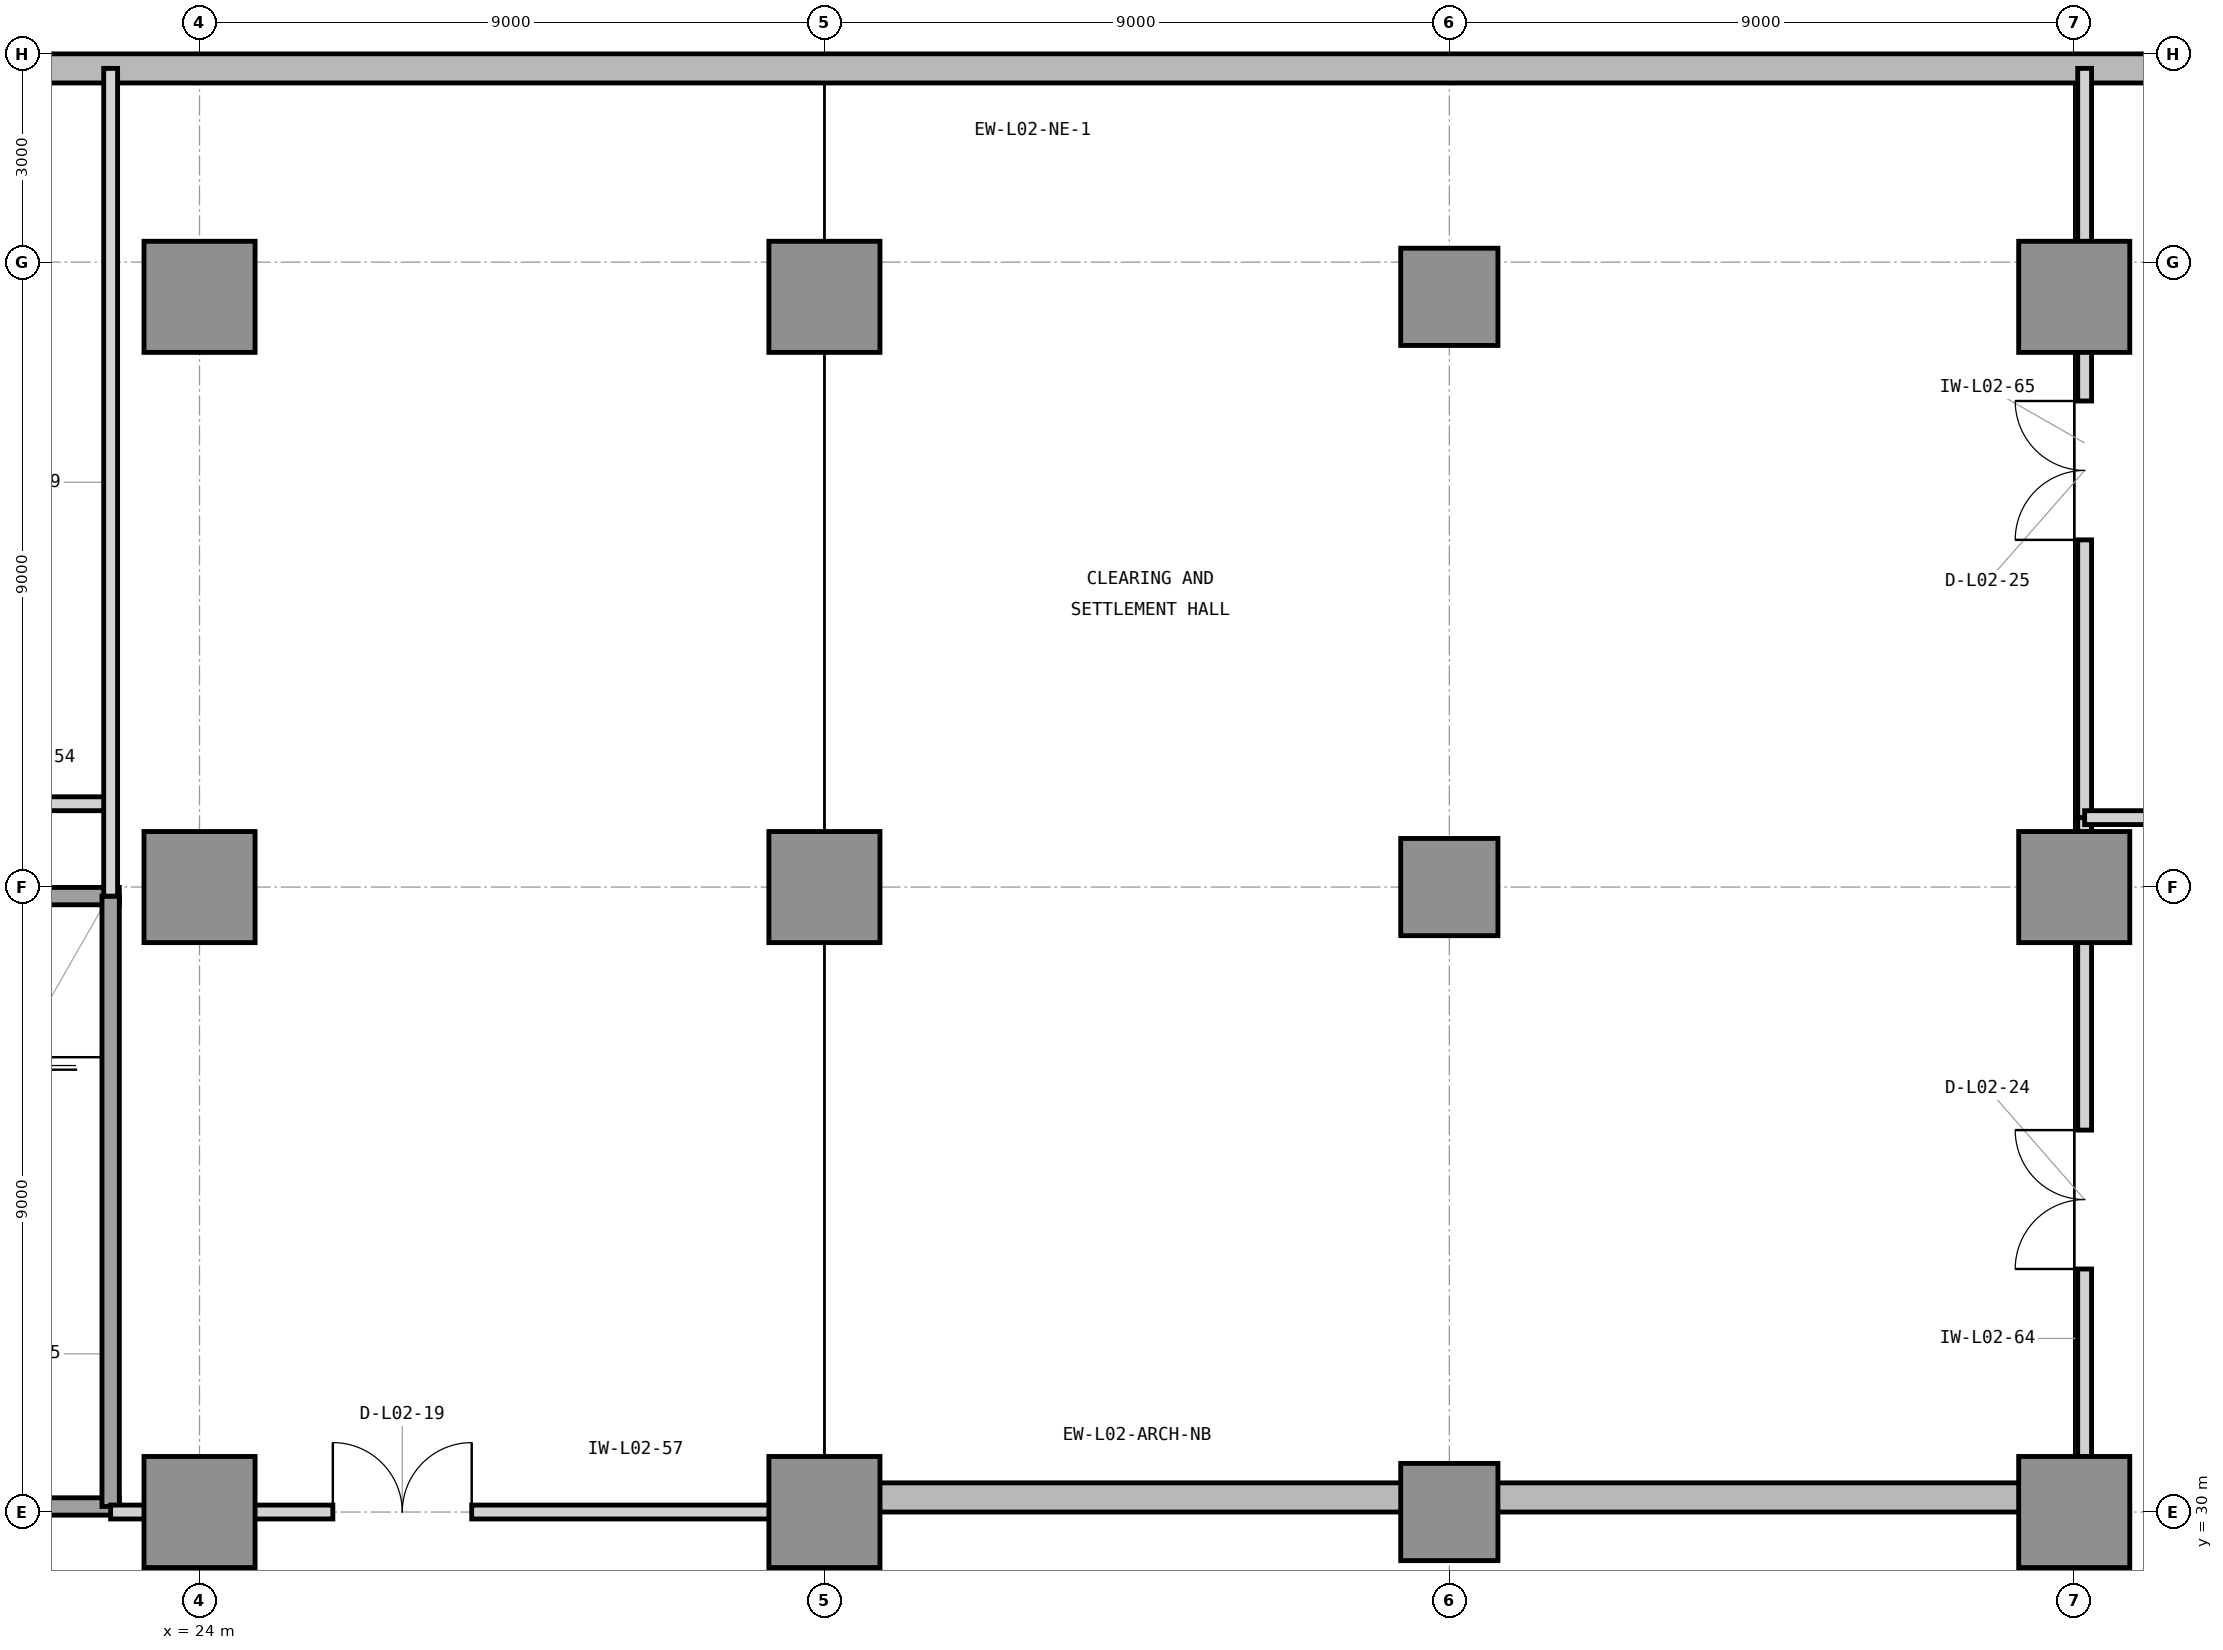
"""IFC4 building model, lengths in metres.
Left out: names, types, materials, properties, quantities, classifications, styles, units other than length and angle.
Written with IfcOpenShell. Run it as: python <this file> out.ifc"""

import sys

from ifc_helpers import new_model, si_unit, direction, frame, frame_2d, origin, origin_2d, place, context, subcontext, project, spatial, rectangle, extrude, element, fill, save


model = new_model("IFC4")
c1 = context("Model", 3, precision=1e-05, world=origin(), true_north=direction((0.0, 1.0)))
c2 = subcontext(c1, "Body", "Model", "MODEL_VIEW")
j1 = project(units=[si_unit("LENGTHUNIT", "METRE"), si_unit("PLANEANGLEUNIT", "RADIAN")], contexts=[c1])
p1 = place(None, origin())
s1 = spatial("IfcSite", under=j1, at=p1, CompositionType="ELEMENT")
p2 = place(p1, origin())
s2 = spatial("IfcBuilding", under=s1, at=p2, CompositionType="ELEMENT")
p3 = place(p2, frame((0.0, 0.0, 10.8)))
s3 = spatial("IfcBuildingStorey", under=s2, at=p3, CompositionType="ELEMENT", Elevation=10.8)
for number, where, z_axis, x_axis in (
    (1, (24.0, 30.0, 0.0), (0.0, 0.0, 1.0), (1.0, 0.0, 0.0)),
    (2, (24.0, 39.0, 0.0), (0.0, 0.0, 1.0), (1.0, 0.0, 0.0)),
    (3, (24.0, 47.5, 0.0), (0.0, 0.0, 1.0), (1.0, 0.0, 0.0)),
    (4, (33.0, 30.0, 0.0), (0.0, 0.0, 1.0), (1.0, 0.0, 0.0)),
    (5, (33.0, 39.0, 0.0), (0.0, 0.0, 1.0), (1.0, 0.0, 0.0)),
    (6, (33.0, 47.5, 0.0), (0.0, 0.0, 1.0), (1.0, 0.0, 0.0)),
):
    element("IfcColumn", number, at=place(p3, frame(where, z_axis=z_axis, x_axis=x_axis)), inside=s3, PredefinedType="COLUMN", context=c2, shape_type="SweptSolid", body=[
        extrude(rectangle(XDim=1.6, YDim=1.6, at=origin_2d()), origin(), (0.0, 0.0, 1.0), 4.8),
    ])
for number, where, z_axis, x_axis in (
    (7, (42.0, 30.0, 0.0), (0.0, 0.0, 1.0), (1.0, 0.0, 0.0)),
    (8, (42.0, 39.0, 0.0), (0.0, 0.0, 1.0), (1.0, 0.0, 0.0)),
    (9, (42.0, 47.5, 0.0), (0.0, 0.0, 1.0), (1.0, 0.0, 0.0)),
):
    element("IfcColumn", number, at=place(p3, frame(where, z_axis=z_axis, x_axis=x_axis)), inside=s3, PredefinedType="COLUMN", context=c2, shape_type="SweptSolid", body=[
        extrude(rectangle(XDim=1.4, YDim=1.4, at=origin_2d()), origin(), (0.0, 0.0, 1.0), 4.8),
    ])
for number, where, z_axis, x_axis in (
    (10, (51.0, 30.0, 0.0), (0.0, 0.0, 1.0), (1.0, 0.0, 0.0)),
    (11, (51.0, 39.0, 0.0), (0.0, 0.0, 1.0), (1.0, 0.0, 0.0)),
    (12, (51.0, 47.5, 0.0), (0.0, 0.0, 1.0), (1.0, 0.0, 0.0)),
):
    element("IfcColumn", number, at=place(p3, frame(where, z_axis=z_axis, x_axis=x_axis)), inside=s3, PredefinedType="COLUMN", context=c2, shape_type="SweptSolid", body=[
        extrude(rectangle(XDim=1.6, YDim=1.6, at=origin_2d()), origin(), (0.0, 0.0, 1.0), 4.8),
    ])
p4 = place(p3, frame((33.0, 30.21, 0.0), z_axis=(0.0, 0.0, 1.0), x_axis=(1.0, 0.0, 0.0)))
e13 = element("IfcWall", 13, at=p4, inside=s3, PredefinedType="STANDARD", context=c2, shape_type="SweptSolid", body=[
    extrude(rectangle(XDim=18.0, YDim=0.42, at=frame_2d((9.0, 0.0))), origin(), (0.0, 0.0, 1.0), 3.85),
])
p5 = place(p3, frame((72.0, 50.79, 0.0), z_axis=(0.0, 0.0, 1.0), x_axis=(-1.0, 0.0, 0.0)))
e14 = element("IfcWall", 14, at=p5, inside=s3, PredefinedType="STANDARD", context=c2, shape_type="SweptSolid", body=[
    extrude(rectangle(XDim=72.0, YDim=0.42, at=frame_2d((36.0, 0.0))), origin(), (0.0, 0.0, 1.0), 4.8),
])
for number, where, z_axis, x_axis in (
    (15, (17.555, 30.08, 0.0), (0.0, 0.0, 1.0), (1.0, 0.0, 0.0)),
    (16, (17.555, 38.87, 0.0), (0.0, 0.0, 1.0), (1.0, 0.0, 0.0)),
):
    element("IfcWall", number, at=place(p3, frame(where, z_axis=z_axis, x_axis=x_axis)), inside=s3, PredefinedType="SHEAR", context=c2, shape_type="SweptSolid", body=[
        extrude(rectangle(XDim=5.29, YDim=0.25, at=frame_2d((2.645, 0.0))), origin(), (0.0, 0.0, 1.0), 5.4),
    ])
p6 = place(p3, frame((22.72, 30.08, 0.0), z_axis=(0.0, 0.0, 1.0), x_axis=(0.0, 1.0, 0.0)))
e17 = element("IfcWall", 17, at=p6, inside=s3, PredefinedType="SHEAR", context=c2, shape_type="SweptSolid", body=[
    extrude(rectangle(XDim=8.79, YDim=0.25, at=frame_2d((4.395, 0.0))), origin(), (0.0, 0.0, 1.0), 5.4),
])
p7 = place(p3, frame((22.72, 30.0, 0.0), z_axis=(0.0, 0.0, 1.0), x_axis=(1.0, 0.0, 0.0)))
e18 = element("IfcWall", 18, at=p7, inside=s3, PredefinedType="PARTITIONING", context=c2, shape_type="SweptSolid", body=[
    extrude(rectangle(XDim=10.08, YDim=0.2, at=frame_2d((5.04, 0.0))), origin(), (0.0, 0.0, 1.0), 3.85),
])
p8 = place(p7, frame((3.2, 0.0, 0.0)))
e19 = element("IfcOpeningElement", 19, at=p8, cuts=e18, PredefinedType="OPENING", context=c2, shape_type="SweptSolid", body=[
    extrude(rectangle(XDim=2.0, YDim=2.5, at=frame_2d((1.0, 1.25))), frame((0.0, 0.11, 0.0), z_axis=(0.0, -1.0, 0.0), x_axis=(1.0, 0.0, 0.0)), (0.0, 0.0, 1.0), 0.22),
])
p9 = place(p3, frame((0.21, 40.2, 0.0), z_axis=(0.0, 0.0, 1.0), x_axis=(1.0, 0.0, 0.0)))
e20 = element("IfcWall", 20, at=p9, inside=s3, PredefinedType="PARTITIONING", context=c2, shape_type="SweptSolid", body=[
    extrude(rectangle(XDim=22.51, YDim=0.2, at=frame_2d((11.255, 0.0))), origin(), (0.0, 0.0, 1.0), 4.79),
])
p10 = place(p9, frame((10.8, 0.0, 0.0)))
e21 = element("IfcOpeningElement", 21, at=p10, cuts=e20, PredefinedType="OPENING", context=c2, shape_type="SweptSolid", body=[
    extrude(rectangle(XDim=1.5, YDim=2.3, at=frame_2d((0.75, 1.15))), frame((0.0, 0.11, 0.0), z_axis=(0.0, -1.0, 0.0), x_axis=(1.0, 0.0, 0.0)), (0.0, 0.0, 1.0), 0.22),
])
p11 = place(p3, frame((22.72, 38.87, 0.0), z_axis=(0.0, 0.0, 1.0), x_axis=(0.0, 1.0, 0.0)))
e22 = element("IfcWall", 22, at=p11, inside=s3, PredefinedType="PARTITIONING", context=c2, shape_type="SweptSolid", body=[
    extrude(rectangle(XDim=11.92, YDim=0.2, at=frame_2d((5.96, 0.0))), origin(), (0.0, 0.0, 1.0), 4.79),
])
p12 = place(p3, frame((51.15, 30.0, 0.0), z_axis=(0.0, 0.0, 1.0), x_axis=(0.0, 1.0, 0.0)))
e23 = element("IfcWall", 23, at=p12, inside=s3, PredefinedType="PARTITIONING", context=c2, shape_type="SweptSolid", body=[
    extrude(rectangle(XDim=10.0, YDim=0.2, at=frame_2d((5.0, 0.0))), origin(), (0.0, 0.0, 1.0), 3.85),
])
p13 = place(p12, frame((3.5, 0.0, 0.0)))
e24 = element("IfcOpeningElement", 24, at=p13, cuts=e23, PredefinedType="OPENING", context=c2, shape_type="SweptSolid", body=[
    extrude(rectangle(XDim=2.0, YDim=2.5, at=frame_2d((1.0, 1.25))), frame((0.0, 0.11, 0.0), z_axis=(0.0, -1.0, 0.0), x_axis=(1.0, 0.0, 0.0)), (0.0, 0.0, 1.0), 0.22),
])
p14 = place(p3, frame((51.15, 40.0, 0.0), z_axis=(0.0, 0.0, 1.0), x_axis=(0.0, 1.0, 0.0)))
e25 = element("IfcWall", 25, at=p14, inside=s3, PredefinedType="PARTITIONING", context=c2, shape_type="SweptSolid", body=[
    extrude(rectangle(XDim=10.79, YDim=0.2, at=frame_2d((5.395, 0.0))), origin(), (0.0, 0.0, 1.0), 3.85),
])
p15 = place(p14, frame((4.0, 0.0, 0.0)))
e26 = element("IfcOpeningElement", 26, at=p15, cuts=e25, PredefinedType="OPENING", context=c2, shape_type="SweptSolid", body=[
    extrude(rectangle(XDim=2.0, YDim=2.5, at=frame_2d((1.0, 1.25))), frame((0.0, 0.11, 0.0), z_axis=(0.0, -1.0, 0.0), x_axis=(1.0, 0.0, 0.0)), (0.0, 0.0, 1.0), 0.22),
])
p16 = place(p3, frame((51.15, 40.0, 0.0), z_axis=(0.0, 0.0, 1.0), x_axis=(1.0, 0.0, 0.0)))
e27 = element("IfcWall", 27, at=p16, inside=s3, PredefinedType="PARTITIONING", context=c2, shape_type="SweptSolid", body=[
    extrude(rectangle(XDim=20.64, YDim=0.2, at=frame_2d((10.32, 0.0))), origin(), (0.0, 0.0, 1.0), 4.79),
])
p17 = place(p16, frame((3.5, 0.0, 0.0)))
e28 = element("IfcOpeningElement", 28, at=p17, cuts=e27, PredefinedType="OPENING", context=c2, shape_type="SweptSolid", body=[
    extrude(rectangle(XDim=2.0, YDim=2.5, at=frame_2d((1.0, 1.25))), frame((0.0, 0.11, 0.0), z_axis=(0.0, -1.0, 0.0), x_axis=(1.0, 0.0, 0.0)), (0.0, 0.0, 1.0), 0.22),
])
p18 = place(p16, frame((14.25, 0.0, 0.0)))
e29 = element("IfcOpeningElement", 29, at=p18, cuts=e27, PredefinedType="OPENING", context=c2, shape_type="SweptSolid", body=[
    extrude(rectangle(XDim=1.2, YDim=2.2, at=frame_2d((0.6, 1.1))), frame((0.0, 0.11, 0.0), z_axis=(0.0, -1.0, 0.0), x_axis=(1.0, 0.0, 0.0)), (0.0, 0.0, 1.0), 0.22),
])
p19 = place(p16, frame((18.25, 0.0, 0.0)))
e30 = element("IfcOpeningElement", 30, at=p19, cuts=e27, PredefinedType="OPENING", context=c2, shape_type="SweptSolid", body=[
    extrude(rectangle(XDim=1.0, YDim=2.15, at=frame_2d((0.5, 1.075))), frame((0.0, 0.11, 0.0), z_axis=(0.0, -1.0, 0.0), x_axis=(1.0, 0.0, 0.0)), (0.0, 0.0, 1.0), 0.22),
])
p20 = place(p8, origin())
e31 = element("IfcDoor", 31, at=p20, inside=s3, OperationType="DOUBLE_DOOR_SINGLE_SWING", PredefinedType="DOOR", context=c2, shape_type="SweptSolid", body=[
    extrude(rectangle(XDim=2.0, YDim=2.5, at=frame_2d((1.0, 1.25))), frame((0.0, 0.025, 0.0), z_axis=(0.0, -1.0, 0.0), x_axis=(1.0, 0.0, 0.0)), (0.0, 0.0, 1.0), 0.05),
])
fill(e19, e31)
p21 = place(p13, origin())
e32 = element("IfcDoor", 32, at=p21, inside=s3, OperationType="DOUBLE_DOOR_SINGLE_SWING", PredefinedType="DOOR", context=c2, shape_type="SweptSolid", body=[
    extrude(rectangle(XDim=2.0, YDim=2.5, at=frame_2d((1.0, 1.25))), frame((0.0, 0.025, 0.0), z_axis=(0.0, -1.0, 0.0), x_axis=(1.0, 0.0, 0.0)), (0.0, 0.0, 1.0), 0.05),
])
fill(e24, e32)
p22 = place(p15, origin())
e33 = element("IfcDoor", 33, at=p22, inside=s3, OperationType="DOUBLE_DOOR_SINGLE_SWING", PredefinedType="DOOR", context=c2, shape_type="SweptSolid", body=[
    extrude(rectangle(XDim=2.0, YDim=2.5, at=frame_2d((1.0, 1.25))), frame((0.0, 0.025, 0.0), z_axis=(0.0, -1.0, 0.0), x_axis=(1.0, 0.0, 0.0)), (0.0, 0.0, 1.0), 0.05),
])
fill(e26, e33)
save(model, sys.argv[1])
